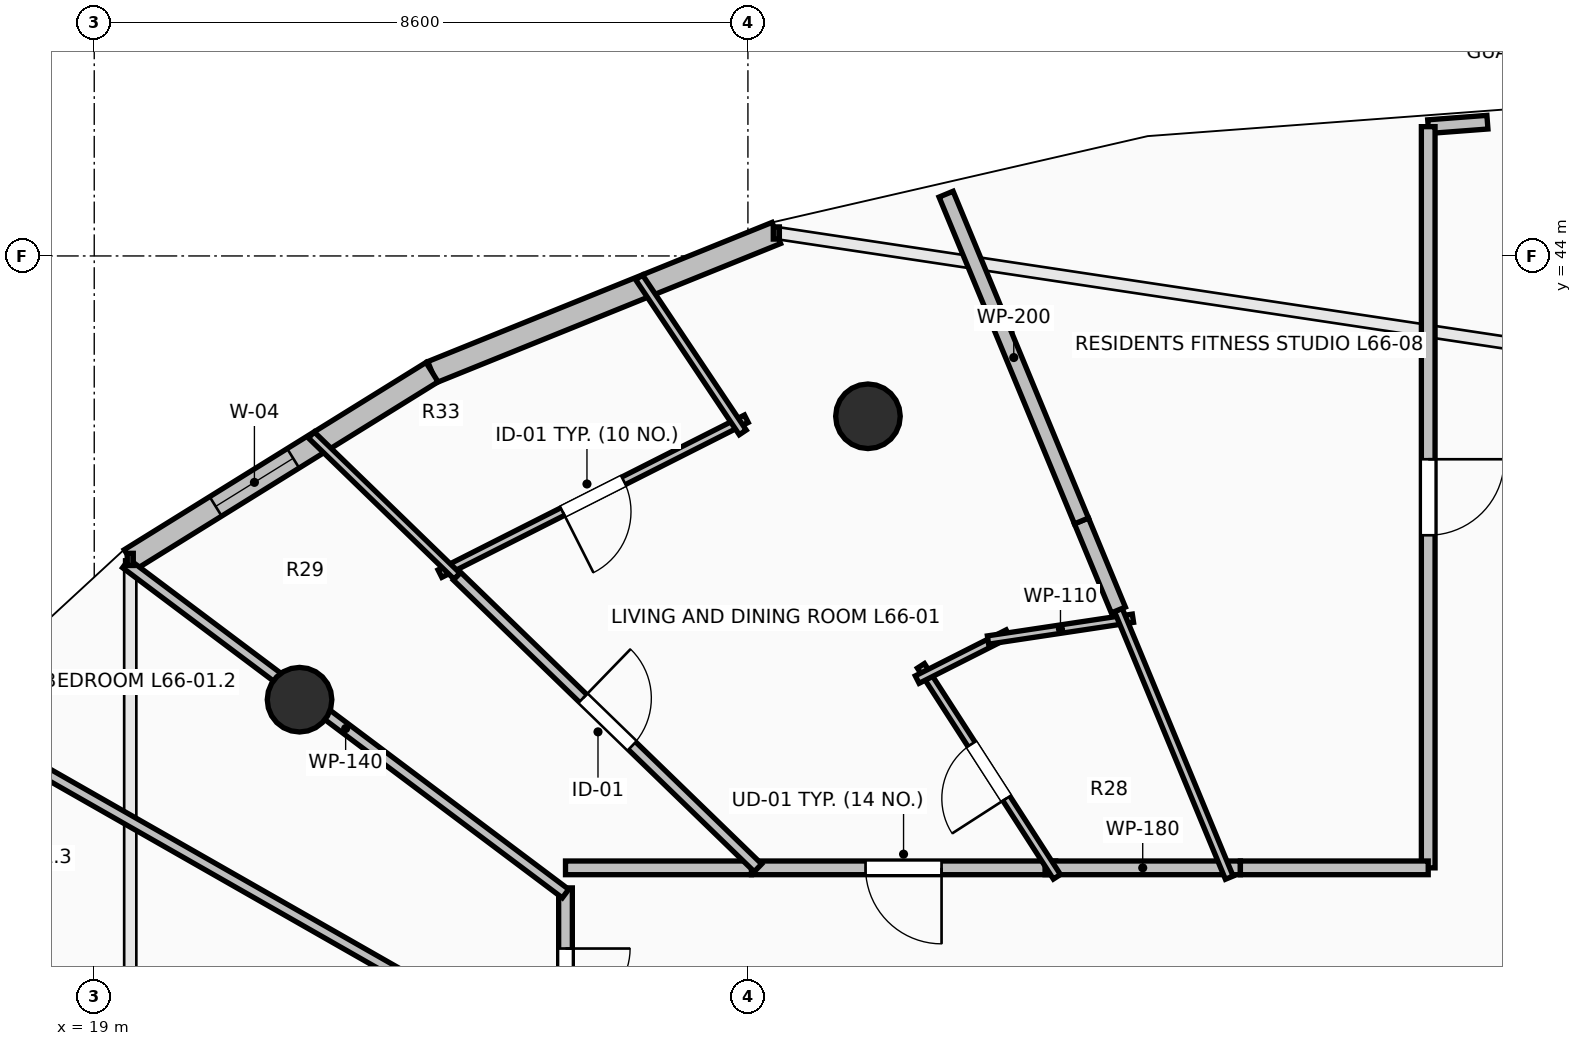
"""IFC4 building model, lengths in metres.
Left out: names, types, materials, properties, quantities, classifications, styles, units other than length and angle.
Written with IfcOpenShell. Run it as: python <this file> out.ifc"""

import sys

from ifc_helpers import new_model, si_unit, direction, frame, frame_2d, origin, origin_2d, place, context, subcontext, project, spatial, rectangle, circle, extrude, element, fill, save


model = new_model("IFC4")
c1 = context("Model", 3, precision=1e-05, world=origin(), true_north=direction((0.0, 1.0)))
c2 = subcontext(c1, "Body", "Model", "MODEL_VIEW")
j1 = project(units=[si_unit("LENGTHUNIT", "METRE"), si_unit("PLANEANGLEUNIT", "RADIAN")], contexts=[c1])
p1 = place(None, origin())
s1 = spatial("IfcSite", under=j1, at=p1, CompositionType="ELEMENT")
p2 = place(p1, origin())
s2 = spatial("IfcBuilding", under=s1, at=p2, CompositionType="ELEMENT")
p3 = place(p2, frame((0.0, 0.0, 244.9)))
s3 = spatial("IfcBuildingStorey", under=s2, at=p3, CompositionType="ELEMENT", Elevation=244.9)
for number, where, z_axis, x_axis in (
    (1, (29.179, 41.891, 0.0), (0.0, 0.0, 1.0), (-0.383, 0.924, 0.0)),
    (2, (21.701, 38.162, 0.0), (0.0, 0.0, 1.0), (-0.707, 0.707, 0.0)),
):
    element("IfcColumn", number, at=place(p3, frame(where, z_axis=z_axis, x_axis=x_axis)), inside=s3, PredefinedType="COLUMN", context=c2, shape_type="SweptSolid", body=[
        extrude(circle(Radius=0.425, at=origin_2d()), origin(), (0.0, 0.0, 1.0), 3.55),
    ])
p4 = place(p3, frame((27.974, 44.302, 0.0), z_axis=(0.0, 0.0, 1.0), x_axis=(-0.927147375511, -0.374696869594, 0.0)))
e3 = element("IfcWall", 3, at=p4, inside=s3, PredefinedType="STANDARD", context=c2, shape_type="SweptSolid", body=[
    extrude(rectangle(XDim=4.885, YDim=0.3, at=frame_2d((2.443, 0.0))), origin(), (0.0, 0.0, 1.0), 3.29),
])
p5 = place(p3, frame((23.444, 42.471, 0.0), z_axis=(0.0, 0.0, 1.0), x_axis=(-0.849702323036, -0.527262707032, 0.0)))
e4 = element("IfcWall", 4, at=p5, inside=s3, PredefinedType="STANDARD", context=c2, shape_type="SweptSolid", body=[
    extrude(rectangle(XDim=4.672, YDim=0.3, at=frame_2d((2.336, 0.0))), origin(), (0.0, 0.0, 1.0), 3.29),
])
p6 = place(p5, frame((2.15, 0.0, 0.85)))
e5 = element("IfcOpeningElement", 5, at=p6, cuts=e4, PredefinedType="OPENING", context=c2, shape_type="SweptSolid", body=[
    extrude(rectangle(XDim=1.2, YDim=1.95, at=frame_2d((0.6, 0.975))), frame((0.0, 0.165, 0.0), z_axis=(0.0, -1.0, 0.0), x_axis=(1.0, 0.0, 0.0)), (0.0, 0.0, 1.0), 0.33),
])
p7 = place(p3, frame((31.649, 35.95, 0.0), z_axis=(0.0, 0.0, 1.0), x_axis=(-1.0, 0.0, 0.0)))
e6 = element("IfcWall", 6, at=p7, inside=s3, PredefinedType="PARTITIONING", context=c2, shape_type="SweptSolid", body=[
    extrude(rectangle(XDim=4.003, YDim=0.18, at=frame_2d((2.001, 0.0))), origin(), (0.0, 0.0, 1.0), 2.482),
])
p8 = place(p7, frame((1.501, 0.0, 0.0)))
e7 = element("IfcOpeningElement", 7, at=p8, cuts=e6, PredefinedType="OPENING", context=c2, shape_type="SweptSolid", body=[
    extrude(rectangle(XDim=1.0, YDim=2.15, at=frame_2d((0.5, 1.075))), frame((0.0, 0.105, 0.0), z_axis=(0.0, -1.0, 0.0), x_axis=(1.0, 0.0, 0.0)), (0.0, 0.0, 1.0), 0.21),
])
p9 = place(p3, frame((34.079, 35.95, 0.0), z_axis=(0.0, 0.0, 1.0), x_axis=(-1.0, 0.0, 0.0)))
e8 = element("IfcWall", 8, at=p9, inside=s3, PredefinedType="PARTITIONING", context=c2, shape_type="SweptSolid", body=[
    extrude(rectangle(XDim=2.57, YDim=0.18, at=frame_2d((1.285, 0.0))), origin(), (0.0, 0.0, 1.0), 3.29),
])
p10 = place(p3, frame((27.646, 35.95, 0.0), z_axis=(0.0, 0.0, 1.0), x_axis=(-1.0, 0.0, 0.0)))
e9 = element("IfcWall", 9, at=p10, inside=s3, PredefinedType="PARTITIONING", context=c2, shape_type="SweptSolid", body=[
    extrude(rectangle(XDim=2.446, YDim=0.18, at=frame_2d((1.223, 0.0))), origin(), (0.0, 0.0, 1.0), 2.482),
])
p11 = place(p3, frame((25.2, 35.686, 0.0), z_axis=(0.0, 0.0, 1.0), x_axis=(0.0, -1.0, 0.0)))
e10 = element("IfcWall", 10, at=p11, inside=s3, PredefinedType="PARTITIONING", context=c2, shape_type="SweptSolid", body=[
    extrude(rectangle(XDim=2.445, YDim=0.18, at=frame_2d((1.223, 0.0))), origin(), (0.0, 0.0, 1.0), 2.482),
])
p12 = place(p11, frame((0.798, 0.0, 0.0)))
e11 = element("IfcOpeningElement", 11, at=p12, cuts=e10, PredefinedType="OPENING", context=c2, shape_type="SweptSolid", body=[
    extrude(rectangle(XDim=0.85, YDim=2.1, at=frame_2d((0.425, 1.05))), frame((0.0, 0.105, 0.0), z_axis=(0.0, -1.0, 0.0), x_axis=(1.0, 0.0, 0.0)), (0.0, 0.0, 1.0), 0.21),
])
p13 = place(p3, frame((37.329, 45.76, 0.0), z_axis=(0.0, 0.0, 1.0), x_axis=(-0.997136622012, -0.0756211415, 0.0)))
e12 = element("IfcWall", 12, at=p13, inside=s3, PredefinedType="PARTITIONING", context=c2, shape_type="SweptSolid", body=[
    extrude(rectangle(XDim=0.781, YDim=0.18, at=frame_2d((0.391, 0.0))), origin(), (0.0, 0.0, 1.0), 3.29),
])
p14 = place(p3, frame((36.55, 45.701, 0.0), z_axis=(0.0, 0.0, 1.0), x_axis=(0.0, -1.0, 0.0)))
e13 = element("IfcWall", 13, at=p14, inside=s3, PredefinedType="PARTITIONING", context=c2, shape_type="SweptSolid", body=[
    extrude(rectangle(XDim=9.751, YDim=0.18, at=frame_2d((4.875, 0.0))), origin(), (0.0, 0.0, 1.0), 2.482),
])
p15 = place(p14, frame((4.375, 0.0, 0.0)))
e14 = element("IfcOpeningElement", 14, at=p15, cuts=e13, PredefinedType="OPENING", context=c2, shape_type="SweptSolid", body=[
    extrude(rectangle(XDim=1.0, YDim=2.15, at=frame_2d((0.5, 1.075))), frame((0.0, 0.105, 0.0), z_axis=(0.0, -1.0, 0.0), x_axis=(1.0, 0.0, 0.0)), (0.0, 0.0, 1.0), 0.21),
])
p16 = place(p3, frame((36.55, 35.95, 0.0), z_axis=(0.0, 0.0, 1.0), x_axis=(-1.0, 0.0, 0.0)))
e15 = element("IfcWall", 15, at=p16, inside=s3, PredefinedType="PARTITIONING", context=c2, shape_type="SweptSolid", body=[
    extrude(rectangle(XDim=2.471, YDim=0.18, at=frame_2d((1.235, 0.0))), origin(), (0.0, 0.0, 1.0), 3.022),
])
p17 = place(p3, frame((31.665, 35.832, 0.0), z_axis=(0.0, 0.0, 1.0), x_axis=(-0.54169901175, 0.840572531474, 0.0)))
e16 = element("IfcWall", 16, at=p17, inside=s3, PredefinedType="PARTITIONING", context=c2, shape_type="SweptSolid", body=[
    extrude(rectangle(XDim=3.302, YDim=0.11, at=frame_2d((1.651, 0.0))), origin(), (0.0, 0.0, 1.0), 2.482),
])
p18 = place(p17, frame((1.226, 0.0, 0.0)))
e17 = element("IfcOpeningElement", 17, at=p18, cuts=e16, PredefinedType="OPENING", context=c2, shape_type="SweptSolid", body=[
    extrude(rectangle(XDim=0.85, YDim=2.1, at=frame_2d((0.425, 1.05))), frame((0.0, 0.07, 0.0), z_axis=(0.0, -1.0, 0.0), x_axis=(1.0, 0.0, 0.0)), (0.0, 0.0, 1.0), 0.14),
])
p19 = place(p3, frame((29.827, 38.427, 0.0), z_axis=(0.0, 0.0, 1.0), x_axis=(0.892302210035, 0.451438551706, 0.0)))
e18 = element("IfcWall", 18, at=p19, inside=s3, PredefinedType="PARTITIONING", context=c2, shape_type="SweptSolid", body=[
    extrude(rectangle(XDim=1.339, YDim=0.11, at=frame_2d((0.669, 0.0))), origin(), (0.0, 0.0, 1.0), 2.972),
])
p20 = place(p3, frame((30.759, 38.947, 0.0), z_axis=(0.0, 0.0, 1.0), x_axis=(0.988889867338, 0.148650026153, 0.0)))
e19 = element("IfcWall", 19, at=p20, inside=s3, PredefinedType="PARTITIONING", context=c2, shape_type="SweptSolid", body=[
    extrude(rectangle(XDim=1.928, YDim=0.11, at=frame_2d((0.964, 0.0))), origin(), (0.0, 0.0, 1.0), 2.972),
])
p21 = place(p3, frame((32.473, 39.342, 0.0), z_axis=(0.0, 0.0, 1.0), x_axis=(0.382813734438, -0.92382554886, 0.0)))
e20 = element("IfcWall", 20, at=p21, inside=s3, PredefinedType="PARTITIONING", context=c2, shape_type="SweptSolid", body=[
    extrude(rectangle(XDim=3.812, YDim=0.11, at=frame_2d((1.906, 0.0))), origin(), (0.0, 0.0, 1.0), 2.482),
])
p22 = place(p3, frame((27.579, 41.858, 0.0), z_axis=(0.0, 0.0, 1.0), x_axis=(-0.892472689139, -0.451101428883, 0.0)))
e21 = element("IfcWall", 21, at=p22, inside=s3, PredefinedType="PARTITIONING", context=c2, shape_type="SweptSolid", body=[
    extrude(rectangle(XDim=4.516, YDim=0.11, at=frame_2d((2.258, 0.0))), origin(), (0.0, 0.0, 1.0), 3.29),
])
p23 = place(p22, frame((1.808, 0.0, 0.0)))
e22 = element("IfcOpeningElement", 22, at=p23, cuts=e21, PredefinedType="OPENING", context=c2, shape_type="SweptSolid", body=[
    extrude(rectangle(XDim=0.9, YDim=2.1, at=frame_2d((0.45, 1.05))), frame((0.0, 0.07, 0.0), z_axis=(0.0, -1.0, 0.0), x_axis=(1.0, 0.0, 0.0)), (0.0, 0.0, 1.0), 0.14),
])
p24 = place(p3, frame((23.773, 39.787, 0.0), z_axis=(0.0, 0.0, 1.0), x_axis=(-0.718131661866, 0.695907261225, 0.0)))
e23 = element("IfcWall", 23, at=p24, inside=s3, PredefinedType="PARTITIONING", context=c2, shape_type="SweptSolid", body=[
    extrude(rectangle(XDim=2.669, YDim=0.11, at=frame_2d((1.335, 0.0))), origin(), (0.0, 0.0, 1.0), 3.29),
])
p25 = place(p3, frame((26.168, 43.719, 0.0), z_axis=(0.0, 0.0, 1.0), x_axis=(0.555733085272, -0.831360774835, 0.0)))
e24 = element("IfcWall", 24, at=p25, inside=s3, PredefinedType="PARTITIONING", context=c2, shape_type="SweptSolid", body=[
    extrude(rectangle(XDim=2.454, YDim=0.11, at=frame_2d((1.227, 0.0))), origin(), (0.0, 0.0, 1.0), 3.29),
])
p26 = place(p3, frame((23.773, 39.787, 0.0), z_axis=(0.0, 0.0, 1.0), x_axis=(0.718070058765, -0.695970826045, 0.0)))
e25 = element("IfcWall", 25, at=p26, inside=s3, PredefinedType="PARTITIONING", context=c2, shape_type="SweptSolid", body=[
    extrude(rectangle(XDim=5.513, YDim=0.14, at=frame_2d((2.756, 0.0))), origin(), (0.0, 0.0, 1.0), 2.482),
])
p27 = place(p26, frame((2.306, 0.0, 0.0)))
e26 = element("IfcOpeningElement", 26, at=p27, cuts=e25, PredefinedType="OPENING", context=c2, shape_type="SweptSolid", body=[
    extrude(rectangle(XDim=0.9, YDim=2.1, at=frame_2d((0.45, 1.05))), frame((0.0, 0.085, 0.0), z_axis=(0.0, -1.0, 0.0), x_axis=(1.0, 0.0, 0.0)), (0.0, 0.0, 1.0), 0.17),
])
p28 = place(p3, frame((32.473, 39.342, 0.0), z_axis=(0.0, 0.0, 1.0), x_axis=(-0.382714507304, 0.923866660238, 0.0)))
e27 = element("IfcWall", 27, at=p28, inside=s3, PredefinedType="PARTITIONING", context=c2, shape_type="SweptSolid", body=[
    extrude(rectangle(XDim=1.268, YDim=0.2, at=frame_2d((0.634, 0.0))), origin(), (0.0, 0.0, 1.0), 2.972),
])
p29 = place(p3, frame((31.988, 40.514, 0.0), z_axis=(0.0, 0.0, 1.0), x_axis=(-0.382733290986, 0.923858878818, 0.0)))
e28 = element("IfcWall", 28, at=p29, inside=s3, PredefinedType="PARTITIONING", context=c2, shape_type="SweptSolid", body=[
    extrude(rectangle(XDim=4.653, YDim=0.2, at=frame_2d((2.327, 0.0))), origin(), (0.0, 0.0, 1.0), 2.874),
])
p30 = place(p3, frame((19.415, 39.954, 0.0), z_axis=(0.0, 0.0, 1.0), x_axis=(0.799712355931, -0.600383334022, 0.0)))
e29 = element("IfcWall", 29, at=p30, inside=s3, PredefinedType="PARTITIONING", context=c2, shape_type="SweptSolid", body=[
    extrude(rectangle(XDim=7.234, YDim=0.14, at=frame_2d((3.617, 0.0))), origin(), (0.0, 0.0, 1.0), 2.482),
])
p31 = place(p3, frame((17.17, 37.881, 0.0), z_axis=(0.0, 0.0, 1.0), x_axis=(0.868639415668, -0.495444815844, 0.0)))
e30 = element("IfcWall", 30, at=p31, inside=s3, PredefinedType="PARTITIONING", context=c2, shape_type="SweptSolid", body=[
    extrude(rectangle(XDim=9.244, YDim=0.14, at=frame_2d((4.622, 0.0))), origin(), (0.0, 0.0, 1.0), 2.874),
])
p32 = place(p3, frame((15.133, 35.472, 0.0), z_axis=(0.0, 0.0, 1.0), x_axis=(0.923891232285, -0.382655185392, 0.0)))
e31 = element("IfcWall", 31, at=p32, inside=s3, PredefinedType="PARTITIONING", context=c2, shape_type="SweptSolid", body=[
    extrude(rectangle(XDim=5.07, YDim=0.2, at=frame_2d((2.535, 0.0))), origin(), (0.0, 0.0, 1.0), 2.874),
])
p33 = place(p6, origin())
e32 = element("IfcWindow", 32, at=p33, inside=s3, PartitioningType="SINGLE_PANEL", PredefinedType="WINDOW", context=c2, shape_type="SweptSolid", body=[
    extrude(rectangle(XDim=1.2, YDim=1.95, at=frame_2d((0.6, 0.975))), frame((0.0, 0.03, 0.0), z_axis=(0.0, -1.0, 0.0), x_axis=(1.0, 0.0, 0.0)), (0.0, 0.0, 1.0), 0.06),
])
fill(e5, e32)
p34 = place(p8, origin())
e33 = element("IfcDoor", 33, at=p34, inside=s3, OperationType="SINGLE_SWING_LEFT", PredefinedType="DOOR", context=c2, shape_type="SweptSolid", body=[
    extrude(rectangle(XDim=1.0, YDim=2.15, at=frame_2d((0.5, 1.075))), frame((0.0, 0.025, 0.0), z_axis=(0.0, -1.0, 0.0), x_axis=(1.0, 0.0, 0.0)), (0.0, 0.0, 1.0), 0.05),
])
fill(e7, e33)
p35 = place(p15, origin())
e34 = element("IfcDoor", 34, at=p35, inside=s3, OperationType="SINGLE_SWING_LEFT", PredefinedType="DOOR", context=c2, shape_type="SweptSolid", body=[
    extrude(rectangle(XDim=1.0, YDim=2.15, at=frame_2d((0.5, 1.075))), frame((0.0, 0.025, 0.0), z_axis=(0.0, -1.0, 0.0), x_axis=(1.0, 0.0, 0.0)), (0.0, 0.0, 1.0), 0.05),
])
fill(e14, e34)
p36 = place(p18, origin())
e35 = element("IfcDoor", 35, at=p36, inside=s3, OperationType="SINGLE_SWING_LEFT", PredefinedType="DOOR", context=c2, shape_type="SweptSolid", body=[
    extrude(rectangle(XDim=0.85, YDim=2.1, at=frame_2d((0.425, 1.05))), frame((0.0, 0.025, 0.0), z_axis=(0.0, -1.0, 0.0), x_axis=(1.0, 0.0, 0.0)), (0.0, 0.0, 1.0), 0.05),
])
fill(e17, e35)
p37 = place(p23, origin())
e36 = element("IfcDoor", 36, at=p37, inside=s3, OperationType="SINGLE_SWING_RIGHT", PredefinedType="DOOR", context=c2, shape_type="SweptSolid", body=[
    extrude(rectangle(XDim=0.9, YDim=2.1, at=frame_2d((0.45, 1.05))), frame((0.0, 0.025, 0.0), z_axis=(0.0, -1.0, 0.0), x_axis=(1.0, 0.0, 0.0)), (0.0, 0.0, 1.0), 0.05),
])
fill(e22, e36)
p38 = place(p27, origin())
e37 = element("IfcDoor", 37, at=p38, inside=s3, OperationType="SINGLE_SWING_LEFT", PredefinedType="DOOR", context=c2, shape_type="SweptSolid", body=[
    extrude(rectangle(XDim=0.9, YDim=2.1, at=frame_2d((0.45, 1.05))), frame((0.0, 0.025, 0.0), z_axis=(0.0, -1.0, 0.0), x_axis=(1.0, 0.0, 0.0)), (0.0, 0.0, 1.0), 0.05),
])
fill(e26, e37)
p39 = place(p12, origin())
e38 = element("IfcDoor", 38, at=p39, inside=s3, OperationType="SINGLE_SWING_LEFT", PredefinedType="DOOR", context=c2, shape_type="SweptSolid", body=[
    extrude(rectangle(XDim=0.85, YDim=2.1, at=frame_2d((0.425, 1.05))), frame((0.0, 0.025, 0.0), z_axis=(0.0, -1.0, 0.0), x_axis=(1.0, 0.0, 0.0)), (0.0, 0.0, 1.0), 0.05),
])
fill(e11, e38)
save(model, sys.argv[1])
